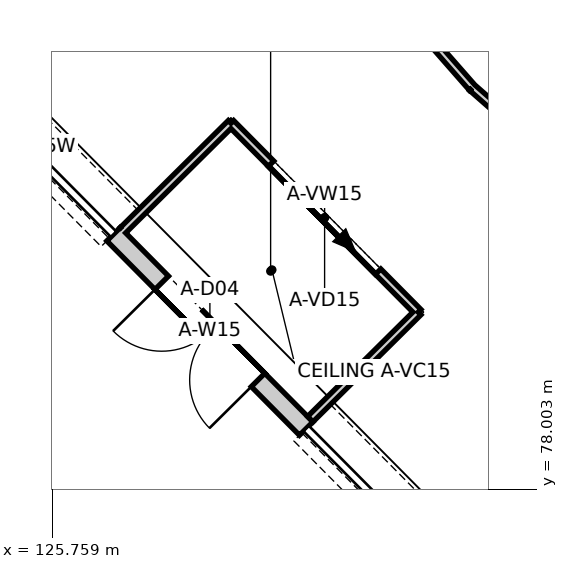
"""IFC4 building model, lengths in metres.
Left out: names, types, materials, properties, quantities, classifications, styles, units other than length and angle.
Written with IfcOpenShell. Run it as: python <this file> out.ifc"""

import sys

from ifc_helpers import new_model, si_unit, direction, frame, frame_2d, origin, place, context, subcontext, project, spatial, polyline, rectangle, outline, extrude, element, fill, save


model = new_model("IFC4")
c1 = context("Model", 3, precision=1e-05, world=origin(), true_north=direction((0.0, 1.0)))
c2 = subcontext(c1, "Body", "Model", "MODEL_VIEW")
j1 = project(units=[si_unit("LENGTHUNIT", "METRE"), si_unit("PLANEANGLEUNIT", "RADIAN")], contexts=[c1])
p1 = place(None, origin())
s1 = spatial("IfcSite", under=j1, at=p1, CompositionType="ELEMENT")
p2 = place(p1, origin())
s2 = spatial("IfcBuilding", under=s1, at=p2, CompositionType="ELEMENT")
p3 = place(p2, origin())
s3 = spatial("IfcBuildingStorey", under=s2, at=p3, CompositionType="ELEMENT", Elevation=0.0)
p4 = place(p3, frame((126.568, 81.359, 0.0), z_axis=(0.0, 0.0, 1.0), x_axis=(0.704014348295, -0.710185748516, 0.0)))
e1 = element("IfcWall", 1, at=p4, inside=s3, PredefinedType="SOLIDWALL", context=c2, shape_type="SweptSolid", body=[
    extrude(rectangle(XDim=3.6, YDim=0.25, at=frame_2d((1.8, 0.0))), origin(), (0.0, 0.0, 1.0), 4.338),
])
p5 = place(p4, frame((0.9, 0.0, 0.0)))
e2 = element("IfcOpeningElement", 2, at=p5, cuts=e1, PredefinedType="OPENING", context=c2, shape_type="SweptSolid", body=[
    extrude(rectangle(XDim=1.8, YDim=2.4, at=frame_2d((0.9, 1.2))), frame((0.0, 0.135, 0.0), z_axis=(0.0, -1.0, 0.0), x_axis=(1.0, 0.0, 0.0)), (0.0, 0.0, 1.0), 0.27),
])
p6 = place(p3, frame((126.692, 81.411, 0.0), z_axis=(0.0, 0.0, 1.0), x_axis=(0.710212756129, 0.703987102887, 0.0)))
e3 = element("IfcWall", 3, at=p6, inside=s3, PredefinedType="PARTITIONING", context=c2, shape_type="SweptSolid", body=[
    extrude(outline(polyline([(0.0, -0.05), (1.95, -0.05), (2.05, 0.05), (0.0, 0.05), (0.0, -0.05)])), origin(), (0.0, 0.0, 1.0), 3.0),
])
p7 = place(p3, frame((128.113, 82.819, 0.0), z_axis=(0.0, 0.0, 1.0), x_axis=(0.704030927659, -0.71016931284, 0.0)))
e4 = element("IfcWall", 4, at=p7, inside=s3, PredefinedType="PARTITIONING", context=c2, shape_type="SweptSolid", body=[
    extrude(outline(polyline([(0.05, -0.05), (3.45, -0.05), (3.55, 0.05), (-0.05, 0.05), (0.05, -0.05)])), origin(), (0.0, 0.0, 1.0), 3.0),
])
p8 = place(p7, frame((0.75, 0.0, 0.0)))
e5 = element("IfcOpeningElement", 5, at=p8, cuts=e4, PredefinedType="OPENING", context=c2, shape_type="SweptSolid", body=[
    extrude(rectangle(XDim=2.0, YDim=2.4, at=frame_2d((1.0, 1.2))), frame((0.0, 0.06, 0.0), z_axis=(0.0, -1.0, 0.0), x_axis=(1.0, 0.0, 0.0)), (0.0, 0.0, 1.0), 0.12),
])
p9 = place(p3, frame((130.577, 80.333, 0.0), z_axis=(0.0, 0.0, 1.0), x_axis=(-0.710212756129, -0.703987102887, 0.0)))
e6 = element("IfcWall", 6, at=p9, inside=s3, PredefinedType="PARTITIONING", context=c2, shape_type="SweptSolid", body=[
    extrude(outline(polyline([(0.05, -0.05), (2.0, -0.05), (2.0, 0.05), (-0.05, 0.05), (0.05, -0.05)])), origin(), (0.0, 0.0, 1.0), 3.0),
])
p10 = place(p3, frame((128.272, 86.724, 0.0), z_axis=(0.0, 0.0, 1.0), x_axis=(0.659317088075, -0.751864999433, 0.0)))
e7 = element("IfcWall", 7, at=p10, inside=s3, PredefinedType="PARTITIONING", context=c2, shape_type="SweptSolid", body=[
    extrude(outline(polyline([(-0.003, -0.05), (4.575, -0.05), (4.568, 0.05), (0.003, 0.05), (-0.003, -0.05)])), origin(), (0.0, 0.0, 1.0), 10.842),
])
p11 = place(p3, frame((131.287, 83.287, 0.0), z_axis=(0.0, 0.0, 1.0), x_axis=(0.751864999433, -0.659317088075, 0.0)))
e8 = element("IfcWall", 8, at=p11, inside=s3, PredefinedType="PARTITIONING", context=c2, shape_type="SweptSolid", body=[
    extrude(outline(polyline([(-0.003, -0.05), (4.575, -0.05), (4.568, 0.05), (0.003, 0.05), (-0.003, -0.05)])), origin(), (0.0, 0.0, 1.0), 10.841),
])
p12 = place(p5, frame((1.8, 0.0, 0.0), z_axis=(0.0, 0.0, 1.0), x_axis=(-1.0, 0.0, 0.0)))
e9 = element("IfcDoor", 9, at=p12, inside=s3, OperationType="DOUBLE_DOOR_SINGLE_SWING", PredefinedType="DOOR", context=c2, shape_type="SweptSolid", body=[
    extrude(rectangle(XDim=1.8, YDim=2.4, at=frame_2d((0.9, 1.2))), frame((0.0, 0.025, 0.0), z_axis=(0.0, -1.0, 0.0), x_axis=(1.0, 0.0, 0.0)), (0.0, 0.0, 1.0), 0.05),
])
fill(e2, e9)
p13 = place(p8, origin())
e10 = element("IfcDoor", 10, at=p13, inside=s3, OperationType="DOUBLE_DOOR_SLIDING", PredefinedType="DOOR", context=c2, shape_type="SweptSolid", body=[
    extrude(rectangle(XDim=2.0, YDim=2.4, at=frame_2d((1.0, 1.2))), frame((0.0, 0.025, 0.0), z_axis=(0.0, -1.0, 0.0), x_axis=(1.0, 0.0, 0.0)), (0.0, 0.0, 1.0), 0.05),
])
fill(e5, e10)
save(model, sys.argv[1])
